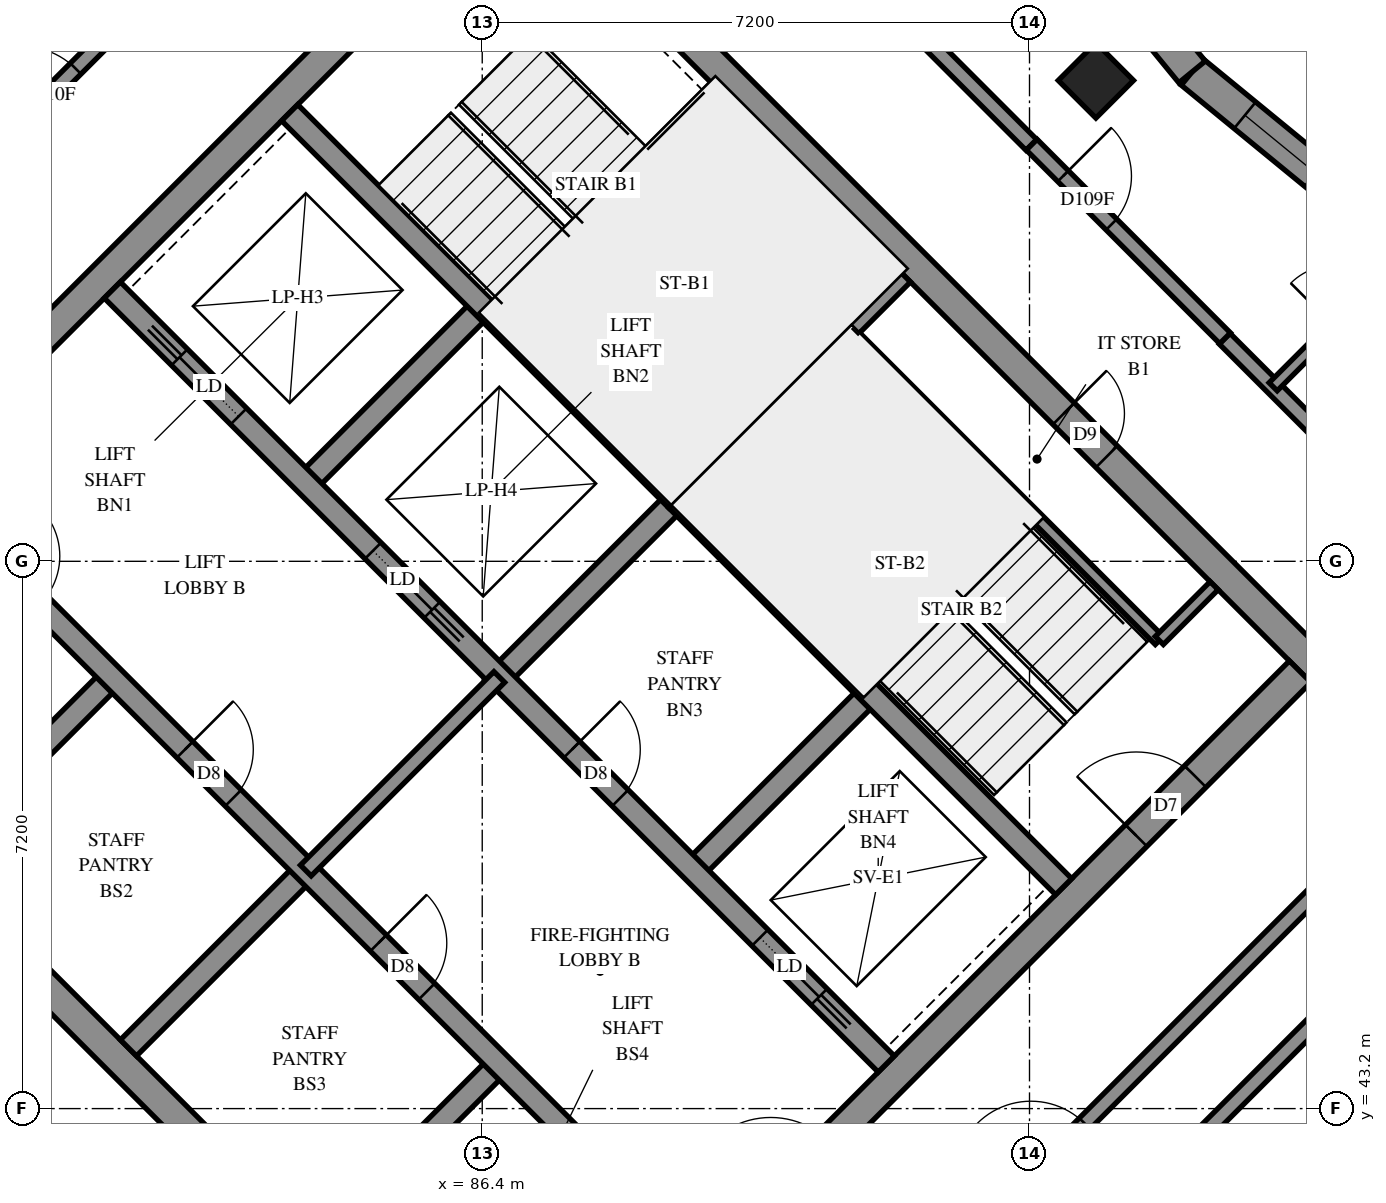
"""IFC4 building model, lengths in metres.
Left out: names, types, materials, properties, quantities, classifications, styles, units other than length and angle.
Written with IfcOpenShell. Run it as: python <this file> out.ifc"""

import sys

from ifc_helpers import new_model, si_unit, direction, frame, frame_2d, origin, origin_2d, place, context, subcontext, project, spatial, polyline, rectangle, outline, extrude, element, fill, save


model = new_model("IFC4")
c1 = context("Model", 3, precision=1e-05, world=origin(), true_north=direction((0.0, 1.0)))
c2 = subcontext(c1, "Body", "Model", "MODEL_VIEW")
j1 = project(units=[si_unit("LENGTHUNIT", "METRE"), si_unit("PLANEANGLEUNIT", "RADIAN")], contexts=[c1])
p1 = place(None, origin())
s1 = spatial("IfcSite", under=j1, at=p1, CompositionType="ELEMENT")
p2 = place(p1, origin())
s2 = spatial("IfcBuilding", under=s1, at=p2, CompositionType="ELEMENT")
p3 = place(p2, frame((0.0, 0.0, 247.2)))
s3 = spatial("IfcBuildingStorey", under=s2, at=p3, CompositionType="ELEMENT", Elevation=247.2)
p4 = place(p3, frame((94.474, 56.727, 0.0), z_axis=(0.0, 0.0, 1.0), x_axis=(0.7071067812, -0.7071067812, 0.0)))
e1 = element("IfcColumn", 1, at=p4, inside=s3, PredefinedType="COLUMN", context=c2, shape_type="SweptSolid", body=[
    extrude(rectangle(XDim=0.7, YDim=0.7, at=origin_2d()), origin(), (0.0, 0.0, 1.0), 3.1),
])
p5 = place(p3, frame((76.23, 49.231, -0.3), z_axis=(0.0, 0.0, 1.0), x_axis=(0.7071034917, -0.7071100706, 0.0)))
e2 = element("IfcWall", 2, at=p5, inside=s3, PredefinedType="SHEAR", context=c2, shape_type="SweptSolid", body=[
    extrude(rectangle(XDim=15.2, YDim=0.4, at=frame_2d((7.6, 0.0))), origin(), (0.0, 0.0, 1.0), 2.7),
])
p6 = place(p3, frame((86.695, 59.696, -0.3), z_axis=(0.0, 0.0, 1.0), x_axis=(0.7071100706, -0.7071034917, 0.0)))
e3 = element("IfcWall", 3, at=p6, inside=s3, PredefinedType="SHEAR", context=c2, shape_type="SweptSolid", body=[
    extrude(rectangle(XDim=15.2, YDim=0.4, at=frame_2d((7.6, 0.0))), origin(), (0.0, 0.0, 1.0), 2.7),
])
p7 = place(p6, frame((10.4, 0.0, 0.3)))
e4 = element("IfcOpeningElement", 4, at=p7, cuts=e3, PredefinedType="OPENING", context=c2, shape_type="SweptSolid", body=[
    extrude(rectangle(XDim=0.8, YDim=2.1, at=frame_2d((0.4, 1.05))), frame((0.0, 0.21, 0.0), z_axis=(0.0, -1.0, 0.0), x_axis=(1.0, 0.0, 0.0)), (0.0, 0.0, 1.0), 0.42),
])
p8 = place(p3, frame((76.513, 49.231, -0.3), z_axis=(0.0, 0.0, 1.0), x_axis=(0.7071067812, 0.7071067812, 0.0)))
e5 = element("IfcWall", 5, at=p8, inside=s3, PredefinedType="SHEAR", context=c2, shape_type="SweptSolid", body=[
    extrude(rectangle(XDim=14.4, YDim=0.4, at=frame_2d((7.2, 0.0))), origin(), (0.0, 0.0, 1.0), 2.7),
])
p9 = place(p8, frame((4.55, 0.0, 0.3)))
e6 = element("IfcOpeningElement", 6, at=p9, cuts=e5, PredefinedType="OPENING", context=c2, shape_type="SweptSolid", body=[
    extrude(rectangle(XDim=1.1, YDim=2.1, at=frame_2d((0.55, 1.05))), frame((0.0, 0.21, 0.0), z_axis=(0.0, -1.0, 0.0), x_axis=(1.0, 0.0, 0.0)), (0.0, 0.0, 1.0), 0.42),
])
p10 = place(p8, frame((11.35, 0.0, 0.3)))
e7 = element("IfcOpeningElement", 7, at=p10, cuts=e5, PredefinedType="OPENING", context=c2, shape_type="SweptSolid", body=[
    extrude(rectangle(XDim=1.1, YDim=2.1, at=frame_2d((0.55, 1.05))), frame((0.0, 0.21, 0.0), z_axis=(0.0, -1.0, 0.0), x_axis=(1.0, 0.0, 0.0)), (0.0, 0.0, 1.0), 0.42),
])
p11 = place(p3, frame((86.978, 38.766, -0.3), z_axis=(0.0, 0.0, 1.0), x_axis=(0.7071067812, 0.7071067812, 0.0)))
e8 = element("IfcWall", 8, at=p11, inside=s3, PredefinedType="SHEAR", context=c2, shape_type="SweptSolid", body=[
    extrude(rectangle(XDim=14.4, YDim=0.4, at=frame_2d((7.2, 0.0))), origin(), (0.0, 0.0, 1.0), 2.7),
])
p12 = place(p11, frame((4.55, 0.0, 0.3)))
e9 = element("IfcOpeningElement", 9, at=p12, cuts=e8, PredefinedType="OPENING", context=c2, shape_type="SweptSolid", body=[
    extrude(rectangle(XDim=1.1, YDim=2.1, at=frame_2d((0.55, 1.05))), frame((0.0, 0.21, 0.0), z_axis=(0.0, -1.0, 0.0), x_axis=(1.0, 0.0, 0.0)), (0.0, 0.0, 1.0), 0.42),
])
p13 = place(p11, frame((11.35, 0.0, 0.3)))
e10 = element("IfcOpeningElement", 10, at=p13, cuts=e8, PredefinedType="OPENING", context=c2, shape_type="SweptSolid", body=[
    extrude(rectangle(XDim=1.1, YDim=2.1, at=frame_2d((0.55, 1.05))), frame((0.0, 0.21, 0.0), z_axis=(0.0, -1.0, 0.0), x_axis=(1.0, 0.0, 0.0)), (0.0, 0.0, 1.0), 0.42),
])
for number, where, z_axis, x_axis in (
    (11, (79.2, 46.544, 0.0), (0.0, 0.0, 1.0), (0.707, 0.707, 0.0)),
    (12, (84.079, 51.423, 0.0), (0.0, 0.0, 1.0), (0.707, 0.707, 0.0)),
):
    element("IfcWall", number, at=place(p3, frame(where, z_axis=z_axis, x_axis=x_axis)), inside=s3, PredefinedType="SOLIDWALL", context=c2, shape_type="SweptSolid", body=[
        extrude(rectangle(XDim=3.3, YDim=0.3, at=frame_2d((1.65, 0.0))), origin(), (0.0, 0.0, 1.0), 3.1),
    ])
p14 = place(p3, frame((81.746, 43.999, 0.0), z_axis=(0.0, 0.0, 1.0), x_axis=(0.7071067812, 0.7071067812, 0.0)))
e13 = element("IfcWall", 13, at=p14, inside=s3, PredefinedType="SOLIDWALL", context=c2, shape_type="SweptSolid", body=[
    extrude(rectangle(XDim=3.3, YDim=0.3, at=frame_2d((1.65, 0.0))), origin(), (0.0, 0.0, 1.0), 3.1),
])
p15 = place(p3, frame((86.625, 48.878, 0.0), z_axis=(0.0, 0.0, 1.0), x_axis=(0.7071067812, 0.7071067812, 0.0)))
e14 = element("IfcWall", 14, at=p15, inside=s3, PredefinedType="SOLIDWALL", context=c2, shape_type="SweptSolid", body=[
    extrude(rectangle(XDim=3.3, YDim=0.3, at=frame_2d((1.65, 0.0))), origin(), (0.0, 0.0, 1.0), 3.1),
])
p16 = place(p3, frame((84.291, 41.453, 0.0), z_axis=(0.0, 0.0, 1.0), x_axis=(0.7071067812, 0.7071067812, 0.0)))
e15 = element("IfcWall", 15, at=p16, inside=s3, PredefinedType="SOLIDWALL", context=c2, shape_type="SweptSolid", body=[
    extrude(rectangle(XDim=3.3, YDim=0.3, at=frame_2d((1.65, 0.0))), origin(), (0.0, 0.0, 1.0), 3.1),
])
p17 = place(p3, frame((89.17, 46.332, 0.0), z_axis=(0.0, 0.0, 1.0), x_axis=(0.7071067812, 0.7071067812, 0.0)))
e16 = element("IfcWall", 16, at=p17, inside=s3, PredefinedType="SOLIDWALL", context=c2, shape_type="SweptSolid", body=[
    extrude(rectangle(XDim=3.3, YDim=0.3, at=frame_2d((1.65, 0.0))), origin(), (0.0, 0.0, 1.0), 3.1),
])
p18 = place(p3, frame((78.988, 51.423, 0.0), z_axis=(0.0, 0.0, 1.0), x_axis=(0.7071067812, -0.7071067812, 0.0)))
e17 = element("IfcWall", 17, at=p18, inside=s3, PredefinedType="SOLIDWALL", context=c2, shape_type="SweptSolid", body=[
    extrude(rectangle(XDim=14.4, YDim=0.3, at=frame_2d((7.2, 0.0))), origin(), (0.0, 0.0, 1.0), 3.1),
])
p19 = place(p18, frame((1.35, 0.0, 0.0)))
e18 = element("IfcOpeningElement", 18, at=p19, cuts=e17, PredefinedType="OPENING", context=c2, shape_type="SweptSolid", body=[
    extrude(rectangle(XDim=0.9, YDim=2.1, at=frame_2d((0.45, 1.05))), frame((0.0, 0.16, 0.0), z_axis=(0.0, -1.0, 0.0), x_axis=(1.0, 0.0, 0.0)), (0.0, 0.0, 1.0), 0.32),
])
p20 = place(p18, frame((4.95, 0.0, 0.0)))
e19 = element("IfcOpeningElement", 19, at=p20, cuts=e17, PredefinedType="OPENING", context=c2, shape_type="SweptSolid", body=[
    extrude(rectangle(XDim=0.9, YDim=2.1, at=frame_2d((0.45, 1.05))), frame((0.0, 0.16, 0.0), z_axis=(0.0, -1.0, 0.0), x_axis=(1.0, 0.0, 0.0)), (0.0, 0.0, 1.0), 0.32),
])
p21 = place(p18, frame((8.55, 0.0, 0.0)))
e20 = element("IfcOpeningElement", 20, at=p21, cuts=e17, PredefinedType="OPENING", context=c2, shape_type="SweptSolid", body=[
    extrude(rectangle(XDim=0.9, YDim=2.1, at=frame_2d((0.45, 1.05))), frame((0.0, 0.16, 0.0), z_axis=(0.0, -1.0, 0.0), x_axis=(1.0, 0.0, 0.0)), (0.0, 0.0, 1.0), 0.32),
])
p22 = place(p18, frame((12.05, 0.0, 0.0)))
e21 = element("IfcOpeningElement", 21, at=p22, cuts=e17, PredefinedType="OPENING", context=c2, shape_type="SweptSolid", body=[
    extrude(rectangle(XDim=1.1, YDim=2.1, at=frame_2d((0.55, 1.05))), frame((0.0, 0.16, 0.0), z_axis=(0.0, -1.0, 0.0), x_axis=(1.0, 0.0, 0.0)), (0.0, 0.0, 1.0), 0.32),
])
p23 = place(p3, frame((81.534, 53.969, 0.0), z_axis=(0.0, 0.0, 1.0), x_axis=(0.707103309, -0.7071102534, 0.0)))
e22 = element("IfcWall", 22, at=p23, inside=s3, PredefinedType="SOLIDWALL", context=c2, shape_type="SweptSolid", body=[
    extrude(rectangle(XDim=14.4, YDim=0.3, at=frame_2d((7.2, 0.0))), origin(), (0.0, 0.0, 1.0), 3.1),
])
p24 = place(p23, frame((8.55, 0.0, 0.0)))
e23 = element("IfcOpeningElement", 23, at=p24, cuts=e22, PredefinedType="OPENING", context=c2, shape_type="SweptSolid", body=[
    extrude(rectangle(XDim=0.9, YDim=2.1, at=frame_2d((0.45, 1.05))), frame((0.0, 0.16, 0.0), z_axis=(0.0, -1.0, 0.0), x_axis=(1.0, 0.0, 0.0)), (0.0, 0.0, 1.0), 0.32),
])
p25 = place(p23, frame((1.25, 0.0, 0.0)))
e24 = element("IfcOpeningElement", 24, at=p25, cuts=e22, PredefinedType="OPENING", context=c2, shape_type="SweptSolid", body=[
    extrude(rectangle(XDim=1.1, YDim=2.1, at=frame_2d((0.55, 1.05))), frame((0.0, 0.16, 0.0), z_axis=(0.0, -1.0, 0.0), x_axis=(1.0, 0.0, 0.0)), (0.0, 0.0, 1.0), 0.32),
])
p26 = place(p23, frame((4.85, 0.0, 0.0)))
e25 = element("IfcOpeningElement", 25, at=p26, cuts=e22, PredefinedType="OPENING", context=c2, shape_type="SweptSolid", body=[
    extrude(rectangle(XDim=1.1, YDim=2.1, at=frame_2d((0.55, 1.05))), frame((0.0, 0.16, 0.0), z_axis=(0.0, -1.0, 0.0), x_axis=(1.0, 0.0, 0.0)), (0.0, 0.0, 1.0), 0.32),
])
p27 = place(p23, frame((12.05, 0.0, 0.0)))
e26 = element("IfcOpeningElement", 26, at=p27, cuts=e22, PredefinedType="OPENING", context=c2, shape_type="SweptSolid", body=[
    extrude(rectangle(XDim=1.1, YDim=2.1, at=frame_2d((0.55, 1.05))), frame((0.0, 0.16, 0.0), z_axis=(0.0, -1.0, 0.0), x_axis=(1.0, 0.0, 0.0)), (0.0, 0.0, 1.0), 0.32),
])
for number, where, z_axis, x_axis in (
    (27, (83.867, 56.302, 0.0), (0.0, 0.0, 1.0), (0.707, -0.707, 0.0)),
    (28, (88.958, 51.211, 0.0), (0.0, 0.0, 1.0), (0.707, -0.707, 0.0)),
):
    element("IfcWall", number, at=place(p3, frame(where, z_axis=z_axis, x_axis=x_axis)), inside=s3, PredefinedType="SOLIDWALL", context=c2, shape_type="SweptSolid", body=[
        extrude(rectangle(XDim=7.2, YDim=0.3, at=frame_2d((3.6, 0.0))), origin(), (0.0, 0.0, 1.0), 3.1),
    ])
p28 = place(p3, frame((88.958, 51.211, 0.0), z_axis=(0.0, 0.0, 1.0), x_axis=(0.7071067812, 0.7071067812, 0.0)))
e29 = element("IfcWall", 29, at=p28, inside=s3, PredefinedType="SOLIDWALL", context=c2, shape_type="SweptSolid", body=[
    extrude(rectangle(XDim=4.2, YDim=0.3, at=frame_2d((2.1, 0.0))), origin(), (0.0, 0.0, 1.0), 3.1),
])
p29 = place(p3, frame((98.325, 54.719, 0.0), z_axis=(0.0, 0.0, 1.0), x_axis=(-0.7734281512, 0.6338839759, 0.0)))
e30 = element("IfcWall", 30, at=p29, inside=s3, PredefinedType="SOLIDWALL", context=c2, shape_type="SweptSolid", body=[
    extrude(outline(polyline([(-0.022, -0.225), (3.322, -0.225), (3.367, 0.225), (0.022, 0.225), (-0.022, -0.225)])), origin(), (0.0, 0.0, 1.0), 3.1),
])
p30 = place(p29, frame((1.245, 0.0, 0.45)))
e31 = element("IfcOpeningElement", 31, at=p30, cuts=e30, PredefinedType="OPENING", context=c2, shape_type="SweptSolid", body=[
    extrude(rectangle(XDim=1.2, YDim=2.55, at=frame_2d((0.6, 1.275))), frame((0.0, 0.235, 0.0), z_axis=(0.0, -1.0, 0.0), x_axis=(1.0, 0.0, 0.0)), (0.0, 0.0, 1.0), 0.47),
])
p31 = place(p3, frame((95.739, 56.839, 0.0), z_axis=(0.0, 0.0, 1.0), x_axis=(-0.6338872028, 0.7734255065, 0.0)))
e32 = element("IfcWall", 32, at=p31, inside=s3, PredefinedType="SOLIDWALL", context=c2, shape_type="SweptSolid", body=[
    extrude(outline(polyline([(0.022, -0.225), (3.367, -0.225), (3.322, 0.225), (-0.022, 0.225), (0.022, -0.225)])), origin(), (0.0, 0.0, 1.0), 3.1),
])
p32 = place(p31, frame((1.371, 0.0, 0.45)))
e33 = element("IfcOpeningElement", 33, at=p32, cuts=e32, PredefinedType="OPENING", context=c2, shape_type="SweptSolid", body=[
    extrude(rectangle(XDim=1.2, YDim=2.55, at=frame_2d((0.6, 1.275))), frame((0.0, 0.235, 0.0), z_axis=(0.0, -1.0, 0.0), x_axis=(1.0, 0.0, 0.0)), (0.0, 0.0, 1.0), 0.47),
])
p33 = place(p3, frame((91.313, 53.354, 0.0), z_axis=(0.0, 0.0, 1.0), x_axis=(0.7071067812, -0.7071067812, 0.0)))
e34 = element("IfcWall", 34, at=p33, inside=s3, PredefinedType="PARTITIONING", context=c2, shape_type="SweptSolid", body=[
    extrude(rectangle(XDim=5.65, YDim=0.15, at=frame_2d((2.825, 0.0))), origin(), (0.0, 0.0, 1.0), 3.1),
])
p34 = place(p3, frame((95.308, 49.358, 0.0), z_axis=(0.0, 0.0, 1.0), x_axis=(0.70705776, 0.707155799, 0.0)))
e35 = element("IfcWall", 35, at=p34, inside=s3, PredefinedType="PARTITIONING", context=c2, shape_type="SweptSolid", body=[
    extrude(rectangle(XDim=1.02, YDim=0.15, at=frame_2d((0.51, 0.0))), origin(), (0.0, 0.0, 1.0), 3.1),
])
p35 = place(p3, frame((84.079, 46.332, 0.0), z_axis=(0.0, 0.0, 1.0), x_axis=(0.7071067812, 0.7071067812, 0.0)))
e36 = element("IfcWall", 36, at=p35, inside=s3, PredefinedType="PARTITIONING", context=c2, shape_type="SweptSolid", body=[
    extrude(rectangle(XDim=3.6, YDim=0.2, at=frame_2d((1.8, 0.0))), origin(), (0.0, 0.0, 1.0), 3.1),
])
p36 = place(p3, frame((93.483, 42.161, 0.0), z_axis=(0.0, 0.0, 1.0), x_axis=(0.7071067812, 0.7071067812, 0.0)))
e37 = element("IfcWall", 37, at=p36, inside=s3, PredefinedType="PARTITIONING", context=c2, shape_type="SweptSolid", body=[
    extrude(rectangle(XDim=9.8, YDim=0.2, at=frame_2d((4.9, 0.0))), origin(), (0.0, 0.0, 1.0), 3.1),
])
p37 = place(p36, frame((0.193, 0.0, 0.0)))
e38 = element("IfcOpeningElement", 38, at=p37, cuts=e37, PredefinedType="OPENING", context=c2, shape_type="SweptSolid", body=[
    extrude(rectangle(XDim=1.0, YDim=2.1, at=frame_2d((0.5, 1.05))), frame((0.0, 0.11, 0.0), z_axis=(0.0, -1.0, 0.0), x_axis=(1.0, 0.0, 0.0)), (0.0, 0.0, 1.0), 0.22),
])
p38 = place(p3, frame((79.907, 55.739, 0.0), z_axis=(0.0, 0.0, 1.0), x_axis=(0.7071067812, 0.7071067812, 0.0)))
e39 = element("IfcWall", 39, at=p38, inside=s3, PredefinedType="PARTITIONING", context=c2, shape_type="SweptSolid", body=[
    extrude(rectangle(XDim=9.798, YDim=0.2, at=frame_2d((4.899, 0.0))), origin(), (0.0, 0.0, 1.0), 3.1),
])
p39 = place(p38, frame((0.617, 0.0, 0.0)))
e40 = element("IfcOpeningElement", 40, at=p39, cuts=e39, PredefinedType="OPENING", context=c2, shape_type="SweptSolid", body=[
    extrude(rectangle(XDim=1.0, YDim=2.1, at=frame_2d((0.5, 1.05))), frame((0.0, 0.11, 0.0), z_axis=(0.0, -1.0, 0.0), x_axis=(1.0, 0.0, 0.0)), (0.0, 0.0, 1.0), 0.22),
])
p40 = place(p3, frame((88.535, 60.971, 0.0), z_axis=(0.0, 0.0, 1.0), x_axis=(0.7069678741, -0.707245661, 0.0)))
e41 = element("IfcWall", 41, at=p40, inside=s3, PredefinedType="PARTITIONING", context=c2, shape_type="SweptSolid", body=[
    extrude(rectangle(XDim=7.2, YDim=0.2, at=frame_2d((3.6, 0.0))), origin(), (0.0, 0.0, 1.0), 3.1),
])
p41 = place(p3, frame((94.331, 41.313, 0.0), z_axis=(0.0, 0.0, 1.0), x_axis=(0.7071139756, 0.7070995867, 0.0)))
e42 = element("IfcWall", 42, at=p41, inside=s3, PredefinedType="PARTITIONING", context=c2, shape_type="SweptSolid", body=[
    extrude(rectangle(XDim=6.95, YDim=0.2, at=frame_2d((3.475, 0.0))), origin(), (0.0, 0.0, 1.0), 3.1),
])
p42 = place(p3, frame((96.167, 53.329, 0.0), z_axis=(0.0, 0.0, 1.0), x_axis=(0.7071067812, -0.7071067812, 0.0)))
e43 = element("IfcWall", 43, at=p42, inside=s3, PredefinedType="PARTITIONING", context=c2, shape_type="SweptSolid", body=[
    extrude(rectangle(XDim=3.999, YDim=0.2, at=frame_2d((2.0, 0.0))), origin(), (0.0, 0.0, 1.0), 3.1),
])
p43 = place(p3, frame((93.629, 55.881, 0.0), z_axis=(0.0, 0.0, 1.0), x_axis=(0.7068288851, -0.7073845681, 0.0)))
e44 = element("IfcWall", 44, at=p43, inside=s3, PredefinedType="PARTITIONING", context=c2, shape_type="SweptSolid", body=[
    extrude(rectangle(XDim=3.599, YDim=0.2, at=frame_2d((1.8, 0.0))), origin(), (0.0, 0.0, 1.0), 3.1),
])
p44 = place(p43, frame((0.584, 0.0, 0.0)))
e45 = element("IfcOpeningElement", 45, at=p44, cuts=e44, PredefinedType="OPENING", context=c2, shape_type="SweptSolid", body=[
    extrude(rectangle(XDim=0.9, YDim=2.1, at=frame_2d((0.45, 1.05))), frame((0.0, 0.11, 0.0), z_axis=(0.0, -1.0, 0.0), x_axis=(1.0, 0.0, 0.0)), (0.0, 0.0, 1.0), 0.22),
])
p45 = place(p3, frame((96.806, 52.696, 0.0), z_axis=(0.0, 0.0, 1.0), x_axis=(0.7070844922, 0.7071290695, 0.0)))
e46 = element("IfcWall", 46, at=p45, inside=s3, PredefinedType="PARTITIONING", context=c2, shape_type="SweptSolid", body=[
    extrude(rectangle(XDim=2.243, YDim=0.15, at=frame_2d((1.122, 0.0))), origin(), (0.0, 0.0, 1.0), 3.1),
])
p46 = place(p45, frame((1.128, 0.0, 0.0)))
e47 = element("IfcOpeningElement", 47, at=p46, cuts=e46, PredefinedType="OPENING", context=c2, shape_type="SweptSolid", body=[
    extrude(rectangle(XDim=0.8, YDim=2.1, at=frame_2d((0.4, 1.05))), frame((0.0, 0.085, 0.0), z_axis=(0.0, -1.0, 0.0), x_axis=(1.0, 0.0, 0.0)), (0.0, 0.0, 1.0), 0.17),
])
p47 = place(p30, origin())
e48 = element("IfcWindow", 48, at=p47, inside=s3, PartitioningType="SINGLE_PANEL", PredefinedType="WINDOW", context=c2, shape_type="SweptSolid", body=[
    extrude(rectangle(XDim=1.2, YDim=2.55, at=frame_2d((0.6, 1.275))), frame((0.0, 0.205, 0.0), z_axis=(0.0, -1.0, 0.0), x_axis=(1.0, 0.0, 0.0)), (0.0, 0.0, 1.0), 0.06),
])
fill(e31, e48)
p48 = place(p7, origin())
e49 = element("IfcDoor", 49, at=p48, inside=s3, OperationType="SINGLE_SWING_RIGHT", PredefinedType="DOOR", context=c2, shape_type="SweptSolid", body=[
    extrude(rectangle(XDim=0.8, YDim=2.1, at=frame_2d((0.4, 1.05))), frame((0.0, 0.025, 0.0), z_axis=(0.0, -1.0, 0.0), x_axis=(1.0, 0.0, 0.0)), (0.0, 0.0, 1.0), 0.05),
])
fill(e4, e49)
p49 = place(p13, origin())
e50 = element("IfcDoor", 50, at=p49, inside=s3, OperationType="SINGLE_SWING_RIGHT", PredefinedType="DOOR", context=c2, shape_type="SweptSolid", body=[
    extrude(rectangle(XDim=1.1, YDim=2.1, at=frame_2d((0.55, 1.05))), frame((0.0, 0.025, 0.0), z_axis=(0.0, -1.0, 0.0), x_axis=(1.0, 0.0, 0.0)), (0.0, 0.0, 1.0), 0.05),
])
fill(e10, e50)
p50 = place(p20, origin())
e51 = element("IfcDoor", 51, at=p50, inside=s3, OperationType="SINGLE_SWING_LEFT", PredefinedType="DOOR", context=c2, shape_type="SweptSolid", body=[
    extrude(rectangle(XDim=0.9, YDim=2.1, at=frame_2d((0.45, 1.05))), frame((0.0, 0.025, 0.0), z_axis=(0.0, -1.0, 0.0), x_axis=(1.0, 0.0, 0.0)), (0.0, 0.0, 1.0), 0.05),
])
fill(e19, e51)
p51 = place(p21, origin())
e52 = element("IfcDoor", 52, at=p51, inside=s3, OperationType="SINGLE_SWING_LEFT", PredefinedType="DOOR", context=c2, shape_type="SweptSolid", body=[
    extrude(rectangle(XDim=0.9, YDim=2.1, at=frame_2d((0.45, 1.05))), frame((0.0, 0.025, 0.0), z_axis=(0.0, -1.0, 0.0), x_axis=(1.0, 0.0, 0.0)), (0.0, 0.0, 1.0), 0.05),
])
fill(e20, e52)
p52 = place(p24, origin())
e53 = element("IfcDoor", 53, at=p52, inside=s3, OperationType="SINGLE_SWING_LEFT", PredefinedType="DOOR", context=c2, shape_type="SweptSolid", body=[
    extrude(rectangle(XDim=0.9, YDim=2.1, at=frame_2d((0.45, 1.05))), frame((0.0, 0.025, 0.0), z_axis=(0.0, -1.0, 0.0), x_axis=(1.0, 0.0, 0.0)), (0.0, 0.0, 1.0), 0.05),
])
fill(e23, e53)
p53 = place(p25, origin())
e54 = element("IfcDoor", 54, at=p53, inside=s3, OperationType="SLIDING_TO_LEFT", PredefinedType="DOOR", context=c2, shape_type="SweptSolid", body=[
    extrude(rectangle(XDim=1.1, YDim=2.1, at=frame_2d((0.55, 1.05))), frame((0.0, 0.025, 0.0), z_axis=(0.0, -1.0, 0.0), x_axis=(1.0, 0.0, 0.0)), (0.0, 0.0, 1.0), 0.05),
])
fill(e24, e54)
p54 = place(p26, origin())
e55 = element("IfcDoor", 55, at=p54, inside=s3, OperationType="SLIDING_TO_RIGHT", PredefinedType="DOOR", context=c2, shape_type="SweptSolid", body=[
    extrude(rectangle(XDim=1.1, YDim=2.1, at=frame_2d((0.55, 1.05))), frame((0.0, 0.025, 0.0), z_axis=(0.0, -1.0, 0.0), x_axis=(1.0, 0.0, 0.0)), (0.0, 0.0, 1.0), 0.05),
])
fill(e25, e55)
p55 = place(p27, origin())
e56 = element("IfcDoor", 56, at=p55, inside=s3, OperationType="SLIDING_TO_RIGHT", PredefinedType="DOOR", context=c2, shape_type="SweptSolid", body=[
    extrude(rectangle(XDim=1.1, YDim=2.1, at=frame_2d((0.55, 1.05))), frame((0.0, 0.025, 0.0), z_axis=(0.0, -1.0, 0.0), x_axis=(1.0, 0.0, 0.0)), (0.0, 0.0, 1.0), 0.05),
])
fill(e26, e56)
p56 = place(p39, origin())
e57 = element("IfcDoor", 57, at=p56, inside=s3, OperationType="SINGLE_SWING_RIGHT", PredefinedType="DOOR", context=c2, shape_type="SweptSolid", body=[
    extrude(rectangle(XDim=1.0, YDim=2.1, at=frame_2d((0.5, 1.05))), frame((0.0, 0.025, 0.0), z_axis=(0.0, -1.0, 0.0), x_axis=(1.0, 0.0, 0.0)), (0.0, 0.0, 1.0), 0.05),
])
fill(e40, e57)
p57 = place(p44, origin())
e58 = element("IfcDoor", 58, at=p57, inside=s3, OperationType="SINGLE_SWING_LEFT", PredefinedType="DOOR", context=c2, shape_type="SweptSolid", body=[
    extrude(rectangle(XDim=0.9, YDim=2.1, at=frame_2d((0.45, 1.05))), frame((0.0, 0.025, 0.0), z_axis=(0.0, -1.0, 0.0), x_axis=(1.0, 0.0, 0.0)), (0.0, 0.0, 1.0), 0.05),
])
fill(e45, e58)
p58 = place(p37, origin())
e59 = element("IfcDoor", 59, at=p58, inside=s3, OperationType="SINGLE_SWING_LEFT", PredefinedType="DOOR", context=c2, shape_type="SweptSolid", body=[
    extrude(rectangle(XDim=1.0, YDim=2.1, at=frame_2d((0.5, 1.05))), frame((0.0, 0.025, 0.0), z_axis=(0.0, -1.0, 0.0), x_axis=(1.0, 0.0, 0.0)), (0.0, 0.0, 1.0), 0.05),
])
fill(e38, e59)
save(model, sys.argv[1])
